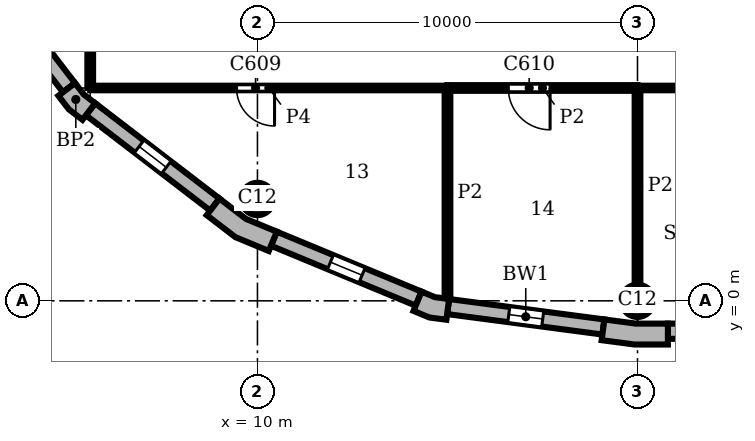
"""IFC4 building model, lengths in metres.
Left out: names, types, materials, properties, quantities, classifications, styles, units other than length and angle.
Written with IfcOpenShell. Run it as: python <this file> out.ifc"""

import sys

from ifc_helpers import new_model, si_unit, direction, frame, frame_2d, origin, origin_2d, place, context, subcontext, project, spatial, polyline, rectangle, circle, outline, extrude, element, fill, save


model = new_model("IFC4")
c1 = context("Model", 3, precision=1e-05, world=origin(), true_north=direction((0.0, 1.0)))
c2 = subcontext(c1, "Body", "Model", "MODEL_VIEW")
j1 = project(units=[si_unit("LENGTHUNIT", "METRE"), si_unit("PLANEANGLEUNIT", "RADIAN")], contexts=[c1])
p1 = place(None, origin())
s1 = spatial("IfcSite", under=j1, at=p1, CompositionType="ELEMENT")
p2 = place(p1, origin())
s2 = spatial("IfcBuilding", under=s1, at=p2, CompositionType="ELEMENT")
p3 = place(p2, frame((0.0, 0.0, 294.3)))
s3 = spatial("IfcBuildingStorey", under=s2, at=p3, CompositionType="ELEMENT", Elevation=294.3)
for number, where, z_axis, x_axis in (
    (1, (20.0, 0.0, 0.0), (0.0, 0.0, 1.0), (1.0, 0.0, 0.0)),
    (2, (10.0, 2.679, 0.0), (0.0, 0.0, 1.0), (1.0, 0.0, 0.0)),
):
    element("IfcColumn", number, at=place(p3, frame(where, z_axis=z_axis, x_axis=x_axis)), inside=s3, PredefinedType="COLUMN", context=c2, shape_type="SweptSolid", body=[
        extrude(circle(Radius=0.425, at=origin_2d()), origin(), (0.0, 0.0, 1.0), 3.9),
    ])
p4 = place(p3, origin())
e3 = element("IfcWall", 3, at=p4, inside=s3, PredefinedType="SOLIDWALL", context=c2, shape_type="SweptSolid", body=[
    extrude(outline(polyline([(19.076, -0.887), (19.057, -1.036), (19.925, -1.15), (20.8, -1.15), (20.8, -1.0), (20.8, -0.6), (19.961, -0.6), (19.128, -0.49), (19.076, -0.887)])), origin(), (0.0, 0.0, 1.0), 3.9),
])
e4 = element("IfcWall", 4, at=p4, inside=s3, PredefinedType="SOLIDWALL", context=c2, shape_type="SweptSolid", body=[
    extrude(outline(polyline([(4.882, 5.487), (4.763, 5.396), (5.038, 5.038), (5.396, 4.763), (5.487, 4.882), (5.731, 5.199), (5.43, 5.43), (5.199, 5.731), (4.882, 5.487)])), origin(), (0.0, 0.0, 1.0), 3.9),
])
e5 = element("IfcWall", 5, at=p4, inside=s3, PredefinedType="SOLIDWALL", context=c2, shape_type="SweptSolid", body=[
    extrude(outline(polyline([(8.757, 2.373), (8.665, 2.254), (9.42, 1.675), (10.299, 1.311), (10.356, 1.449), (10.51, 1.819), (9.698, 2.155), (9.0, 2.69), (8.757, 2.373)])), origin(), (0.0, 0.0, 1.0), 3.9),
])
e6 = element("IfcWall", 6, at=p4, inside=s3, PredefinedType="SOLIDWALL", context=c2, shape_type="SweptSolid", body=[
    extrude(outline(polyline([(14.164, -0.128), (14.106, -0.266), (14.523, -0.439), (14.971, -0.498), (14.99, -0.349), (15.043, 0.047), (14.667, 0.097), (14.317, 0.242), (14.164, -0.128)])), origin(), (0.0, 0.0, 1.0), 3.9),
])
p5 = place(p3, frame((20.8, -0.8, 0.0), z_axis=(0.0, 0.0, 1.0), x_axis=(1.0, 0.0, 0.0)))
e7 = element("IfcWall", 7, at=p5, inside=s3, PredefinedType="SOLIDWALL", context=c2, shape_type="SweptSolid", body=[
    extrude(rectangle(XDim=18.4, YDim=0.4, at=frame_2d((9.2, 0.0))), origin(), (0.0, 0.0, 1.0), 3.9),
])
p6 = place(p5, frame((3.75, 0.0, 0.9)))
e8 = element("IfcOpeningElement", 8, at=p6, cuts=e7, PredefinedType="OPENING", context=c2, shape_type="SweptSolid", body=[
    extrude(rectangle(XDim=0.9, YDim=2.35, at=frame_2d((0.45, 1.175))), frame((0.0, 0.21, 0.0), z_axis=(0.0, -1.0, 0.0), x_axis=(1.0, 0.0, 0.0)), (0.0, 0.0, 1.0), 0.42),
])
p7 = place(p5, frame((13.75, 0.0, 0.9)))
e9 = element("IfcOpeningElement", 9, at=p7, cuts=e7, PredefinedType="OPENING", context=c2, shape_type="SweptSolid", body=[
    extrude(rectangle(XDim=0.9, YDim=2.35, at=frame_2d((0.45, 1.175))), frame((0.0, 0.21, 0.0), z_axis=(0.0, -1.0, 0.0), x_axis=(1.0, 0.0, 0.0)), (0.0, 0.0, 1.0), 0.42),
])
p8 = place(p3, frame((2.532, 8.878, 0.0), z_axis=(0.0, 0.0, 1.0), x_axis=(0.608759824817, -0.793354571229, 0.0)))
e10 = element("IfcWall", 10, at=p8, inside=s3, PredefinedType="SOLIDWALL", context=c2, shape_type="SweptSolid", body=[
    extrude(rectangle(XDim=4.121, YDim=0.4, at=frame_2d((2.061, 0.0))), origin(), (0.0, 0.0, 1.0), 3.9),
])
p9 = place(p8, frame((1.611, 0.0, 0.9)))
e11 = element("IfcOpeningElement", 11, at=p9, cuts=e10, PredefinedType="OPENING", context=c2, shape_type="SweptSolid", body=[
    extrude(rectangle(XDim=0.9, YDim=2.35, at=frame_2d((0.45, 1.175))), frame((0.0, 0.21, 0.0), z_axis=(0.0, -1.0, 0.0), x_axis=(1.0, 0.0, 0.0)), (0.0, 0.0, 1.0), 0.42),
])
p10 = place(p3, frame((5.609, 5.041, 0.0), z_axis=(0.0, 0.0, 1.0), x_axis=(0.793354571229, -0.608759824817, 0.0)))
e12 = element("IfcWall", 12, at=p10, inside=s3, PredefinedType="SOLIDWALL", context=c2, shape_type="SweptSolid", body=[
    extrude(rectangle(XDim=4.121, YDim=0.4, at=frame_2d((2.061, 0.0))), origin(), (0.0, 0.0, 1.0), 3.9),
])
p11 = place(p10, frame((1.611, 0.0, 0.9)))
e13 = element("IfcOpeningElement", 13, at=p11, cuts=e12, PredefinedType="OPENING", context=c2, shape_type="SweptSolid", body=[
    extrude(rectangle(XDim=0.9, YDim=2.35, at=frame_2d((0.45, 1.175))), frame((0.0, 0.21, 0.0), z_axis=(0.0, -1.0, 0.0), x_axis=(1.0, 0.0, 0.0)), (0.0, 0.0, 1.0), 0.42),
])
p12 = place(p3, frame((10.433, 1.634, 0.0), z_axis=(0.0, 0.0, 1.0), x_axis=(0.923863744394, -0.382721546029, 0.0)))
e14 = element("IfcWall", 14, at=p12, inside=s3, PredefinedType="SOLIDWALL", context=c2, shape_type="SweptSolid", body=[
    extrude(rectangle(XDim=4.121, YDim=0.4, at=frame_2d((2.061, 0.0))), origin(), (0.0, 0.0, 1.0), 3.9),
])
p13 = place(p12, frame((1.611, 0.0, 0.9)))
e15 = element("IfcOpeningElement", 15, at=p13, cuts=e14, PredefinedType="OPENING", context=c2, shape_type="SweptSolid", body=[
    extrude(rectangle(XDim=0.9, YDim=2.35, at=frame_2d((0.45, 1.175))), frame((0.0, 0.21, 0.0), z_axis=(0.0, -1.0, 0.0), x_axis=(1.0, 0.0, 0.0)), (0.0, 0.0, 1.0), 0.42),
])
p14 = place(p3, frame((15.017, -0.151, 0.0), z_axis=(0.0, 0.0, 1.0), x_axis=(0.991446429508, -0.130514280502, 0.0)))
e16 = element("IfcWall", 16, at=p14, inside=s3, PredefinedType="SOLIDWALL", context=c2, shape_type="SweptSolid", body=[
    extrude(rectangle(XDim=4.121, YDim=0.4, at=frame_2d((2.061, 0.0))), origin(), (0.0, 0.0, 1.0), 3.9),
])
p15 = place(p14, frame((1.611, 0.0, 0.9)))
e17 = element("IfcOpeningElement", 17, at=p15, cuts=e16, PredefinedType="OPENING", context=c2, shape_type="SweptSolid", body=[
    extrude(rectangle(XDim=0.9, YDim=2.35, at=frame_2d((0.45, 1.175))), frame((0.0, 0.21, 0.0), z_axis=(0.0, -1.0, 0.0), x_axis=(1.0, 0.0, 0.0)), (0.0, 0.0, 1.0), 0.42),
])
p16 = place(p3, frame((5.6, 5.6, 0.0), z_axis=(0.0, 0.0, 1.0), x_axis=(0.0, 1.0, 0.0)))
e18 = element("IfcWall", 18, at=p16, inside=s3, PredefinedType="PARTITIONING", context=c2, shape_type="SweptSolid", body=[
    extrude(rectangle(XDim=22.4, YDim=0.15, at=frame_2d((11.2, 0.0))), origin(), (0.0, 0.0, 1.0), 3.58),
])
p17 = place(p16, frame((4.1, 0.0, 0.0)))
e19 = element("IfcOpeningElement", 19, at=p17, cuts=e18, PredefinedType="OPENING", context=c2, shape_type="SweptSolid", body=[
    extrude(rectangle(XDim=0.8, YDim=2.1, at=frame_2d((0.4, 1.05))), frame((0.0, 0.085, 0.0), z_axis=(0.0, -1.0, 0.0), x_axis=(1.0, 0.0, 0.0)), (0.0, 0.0, 1.0), 0.17),
])
p18 = place(p16, frame((11.5, 0.0, 0.0)))
e20 = element("IfcOpeningElement", 20, at=p18, cuts=e18, PredefinedType="OPENING", context=c2, shape_type="SweptSolid", body=[
    extrude(rectangle(XDim=1.1, YDim=2.1, at=frame_2d((0.55, 1.05))), frame((0.0, 0.085, 0.0), z_axis=(0.0, -1.0, 0.0), x_axis=(1.0, 0.0, 0.0)), (0.0, 0.0, 1.0), 0.17),
])
p19 = place(p3, frame((15.0, 0.063, 0.0), z_axis=(0.0, 0.0, 1.0), x_axis=(0.0, 1.0, 0.0)))
e21 = element("IfcWall", 21, at=p19, inside=s3, PredefinedType="PARTITIONING", context=c2, shape_type="SweptSolid", body=[
    extrude(rectangle(XDim=5.537, YDim=0.15, at=frame_2d((2.769, 0.0))), origin(), (0.0, 0.0, 1.0), 3.58),
])
p20 = place(p3, frame((20.0, 0.425, 0.0), z_axis=(0.0, 0.0, 1.0), x_axis=(0.0, 1.0, 0.0)))
e22 = element("IfcWall", 22, at=p20, inside=s3, PredefinedType="PARTITIONING", context=c2, shape_type="SweptSolid", body=[
    extrude(rectangle(XDim=5.175, YDim=0.15, at=frame_2d((2.587, 0.0))), origin(), (0.0, 0.0, 1.0), 3.58),
])
p21 = place(p3, frame((15.0, 5.6, 0.0), z_axis=(0.0, 0.0, 1.0), x_axis=(1.0, 0.0, 0.0)))
e23 = element("IfcWall", 23, at=p21, inside=s3, PredefinedType="PARTITIONING", context=c2, shape_type="SweptSolid", body=[
    extrude(rectangle(XDim=5.0, YDim=0.15, at=frame_2d((2.5, 0.0))), origin(), (0.0, 0.0, 1.0), 3.58),
])
p22 = place(p21, frame((1.6, 0.0, 0.0)))
e24 = element("IfcOpeningElement", 24, at=p22, cuts=e23, PredefinedType="OPENING", context=c2, shape_type="SweptSolid", body=[
    extrude(rectangle(XDim=1.1, YDim=2.1, at=frame_2d((0.55, 1.05))), frame((0.0, 0.085, 0.0), z_axis=(0.0, -1.0, 0.0), x_axis=(1.0, 0.0, 0.0)), (0.0, 0.0, 1.0), 0.17),
])
p23 = place(p3, frame((5.6, 5.6, 0.0), z_axis=(0.0, 0.0, 1.0), x_axis=(1.0, 0.0, 0.0)))
e25 = element("IfcWall", 25, at=p23, inside=s3, PredefinedType="PARTITIONING", context=c2, shape_type="SweptSolid", body=[
    extrude(rectangle(XDim=9.4, YDim=0.12, at=frame_2d((4.7, 0.0))), origin(), (0.0, 0.0, 1.0), 3.58),
])
p24 = place(p23, frame((3.85, 0.0, 0.0)))
e26 = element("IfcOpeningElement", 26, at=p24, cuts=e25, PredefinedType="OPENING", context=c2, shape_type="SweptSolid", body=[
    extrude(rectangle(XDim=1.0, YDim=2.1, at=frame_2d((0.5, 1.05))), frame((0.0, 0.07, 0.0), z_axis=(0.0, -1.0, 0.0), x_axis=(1.0, 0.0, 0.0)), (0.0, 0.0, 1.0), 0.14),
])
p25 = place(p3, frame((20.0, 5.6, 0.0), z_axis=(0.0, 0.0, 1.0), x_axis=(1.0, 0.0, 0.0)))
e27 = element("IfcWall", 27, at=p25, inside=s3, PredefinedType="PARTITIONING", context=c2, shape_type="SweptSolid", body=[
    extrude(rectangle(XDim=11.0, YDim=0.12, at=frame_2d((5.5, 0.0))), origin(), (0.0, 0.0, 1.0), 3.58),
])
p26 = place(p11, origin())
e28 = element("IfcWindow", 28, at=p26, inside=s3, PartitioningType="SINGLE_PANEL", PredefinedType="WINDOW", context=c2, shape_type="SweptSolid", body=[
    extrude(rectangle(XDim=0.9, YDim=2.35, at=frame_2d((0.45, 1.175))), frame((0.0, 0.16, 0.0), z_axis=(0.0, -1.0, 0.0), x_axis=(1.0, 0.0, 0.0)), (0.0, 0.0, 1.0), 0.06),
])
fill(e13, e28)
p27 = place(p13, origin())
e29 = element("IfcWindow", 29, at=p27, inside=s3, PartitioningType="SINGLE_PANEL", PredefinedType="WINDOW", context=c2, shape_type="SweptSolid", body=[
    extrude(rectangle(XDim=0.9, YDim=2.35, at=frame_2d((0.45, 1.175))), frame((0.0, 0.16, 0.0), z_axis=(0.0, -1.0, 0.0), x_axis=(1.0, 0.0, 0.0)), (0.0, 0.0, 1.0), 0.06),
])
fill(e15, e29)
p28 = place(p15, origin())
e30 = element("IfcWindow", 30, at=p28, inside=s3, PartitioningType="SINGLE_PANEL", PredefinedType="WINDOW", context=c2, shape_type="SweptSolid", body=[
    extrude(rectangle(XDim=0.9, YDim=2.35, at=frame_2d((0.45, 1.175))), frame((0.0, 0.16, 0.0), z_axis=(0.0, -1.0, 0.0), x_axis=(1.0, 0.0, 0.0)), (0.0, 0.0, 1.0), 0.06),
])
fill(e17, e30)
p29 = place(p24, frame((1.0, 0.0, 0.0), z_axis=(0.0, 0.0, 1.0), x_axis=(-1.0, 0.0, 0.0)))
e31 = element("IfcDoor", 31, at=p29, inside=s3, OperationType="SINGLE_SWING_LEFT", PredefinedType="DOOR", context=c2, shape_type="SweptSolid", body=[
    extrude(rectangle(XDim=1.0, YDim=2.1, at=frame_2d((0.5, 1.05))), frame((0.0, 0.025, 0.0), z_axis=(0.0, -1.0, 0.0), x_axis=(1.0, 0.0, 0.0)), (0.0, 0.0, 1.0), 0.05),
])
fill(e26, e31)
p30 = place(p22, frame((1.1, 0.0, 0.0), z_axis=(0.0, 0.0, 1.0), x_axis=(-1.0, 0.0, 0.0)))
e32 = element("IfcDoor", 32, at=p30, inside=s3, OperationType="SINGLE_SWING_LEFT", PredefinedType="DOOR", context=c2, shape_type="SweptSolid", body=[
    extrude(rectangle(XDim=1.1, YDim=2.1, at=frame_2d((0.55, 1.05))), frame((0.0, 0.025, 0.0), z_axis=(0.0, -1.0, 0.0), x_axis=(1.0, 0.0, 0.0)), (0.0, 0.0, 1.0), 0.05),
])
fill(e24, e32)
save(model, sys.argv[1])
